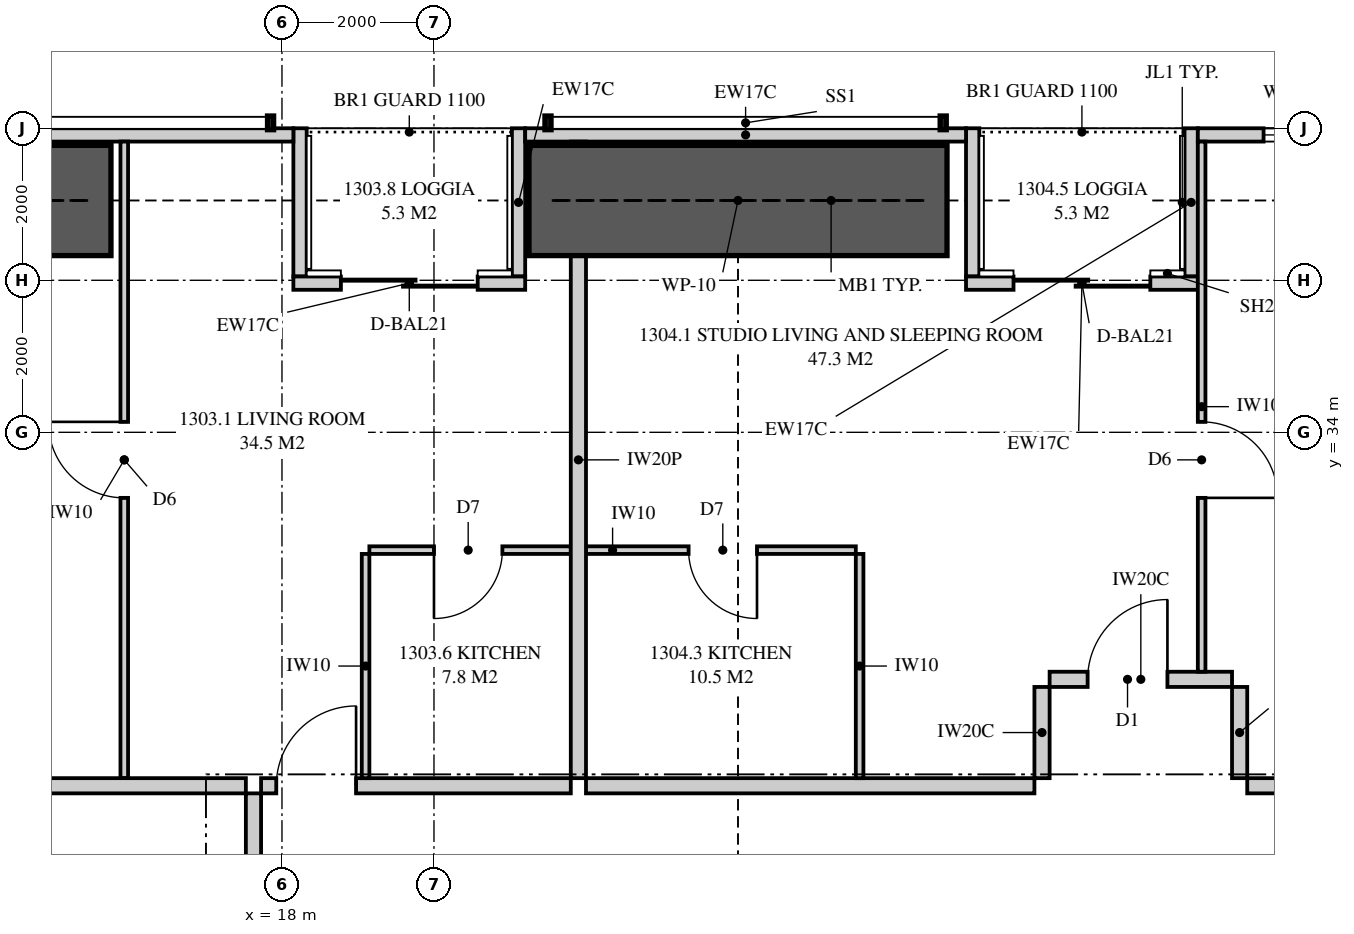
"""IFC4 building model, lengths in metres.
Left out: names, types, materials, properties, quantities, classifications, styles, units other than length and angle.
Written with IfcOpenShell. Run it as: python <this file> out.ifc"""

import sys

from ifc_helpers import new_model, si_unit, direction, frame, frame_2d, origin, place, context, subcontext, project, spatial, polyline, rectangle, outline, extrude, element, fill, save


model = new_model("IFC4")
c1 = context("Model", 3, precision=1e-05, world=origin(), true_north=direction((0.0, 1.0)))
c2 = subcontext(c1, "Body", "Model", "MODEL_VIEW")
j1 = project(units=[si_unit("LENGTHUNIT", "METRE"), si_unit("PLANEANGLEUNIT", "RADIAN")], contexts=[c1])
p1 = place(None, origin())
s1 = spatial("IfcSite", under=j1, at=p1, CompositionType="ELEMENT")
p2 = place(p1, origin())
s2 = spatial("IfcBuilding", under=s1, at=p2, CompositionType="ELEMENT")
p3 = place(p2, frame((0.0, 0.0, 51.15)))
s3 = spatial("IfcBuildingStorey", under=s2, at=p3, CompositionType="ELEMENT", Elevation=51.15)
p4 = place(p3, frame((38.149, 37.913, 0.0), z_axis=(0.0, 0.0, 1.0), x_axis=(-1.0, 0.0, 0.0)))
e1 = element("IfcWall", 1, at=p4, inside=s3, PredefinedType="SOLIDWALL", context=c2, shape_type="SweptSolid", body=[
    extrude(outline(polyline([(0.0, 0.0), (8.099, 0.0), (8.099, 2.15), (3.149, 2.15), (3.149, 3.11), (2.993, 3.11), (2.993, 2.15), (2.945, 2.15), (2.945, 3.11), (0.0, 3.11), (0.0, 0.0)])), frame((0.0, 0.087, 0.0), z_axis=(0.0, -1.0, 0.0), x_axis=(1.0, 0.0, 0.0)), (0.0, 0.0, 1.0), 0.175),
])
p5 = place(p4, frame((6.034, 0.0, 0.4)))
e2 = element("IfcOpeningElement", 2, at=p5, cuts=e1, PredefinedType="OPENING", context=c2, shape_type="SweptSolid", body=[
    extrude(rectangle(XDim=1.2, YDim=1.7, at=frame_2d((0.6, 0.85))), frame((0.0, 0.097, 0.0), z_axis=(0.0, -1.0, 0.0), x_axis=(1.0, 0.0, 0.0)), (0.0, 0.0, 1.0), 0.195),
])
p6 = place(p3, frame((27.0, 37.913, 0.0), z_axis=(0.0, 0.0, 1.0), x_axis=(-1.0, 0.0, 0.0)))
e3 = element("IfcWall", 3, at=p6, inside=s3, PredefinedType="SOLIDWALL", context=c2, shape_type="SweptSolid", body=[
    extrude(rectangle(XDim=5.8, YDim=0.175, at=frame_2d((2.9, 0.0))), origin(), (0.0, 0.0, 1.0), 2.15),
])
p7 = place(p3, frame((18.15, 37.913, 0.0), z_axis=(0.0, 0.0, 1.0), x_axis=(-1.0, 0.0, 0.0)))
e4 = element("IfcWall", 4, at=p7, inside=s3, PredefinedType="SOLIDWALL", context=c2, shape_type="SweptSolid", body=[
    extrude(outline(polyline([(0.0, 0.0), (13.099, 0.0), (13.099, 3.11), (5.354, 3.11), (5.354, 2.15), (5.306, 2.15), (5.306, 3.11), (5.15, 3.11), (5.15, 2.15), (0.0, 2.15), (0.0, 0.0)])), frame((0.0, 0.087, 0.0), z_axis=(0.0, -1.0, 0.0), x_axis=(1.0, 0.0, 0.0)), (0.0, 0.0, 1.0), 0.175),
])
p8 = place(p7, frame((9.05, 0.0, 0.4)))
e5 = element("IfcOpeningElement", 5, at=p8, cuts=e4, PredefinedType="OPENING", context=c2, shape_type="SweptSolid", body=[
    extrude(rectangle(XDim=1.8, YDim=1.7, at=frame_2d((0.9, 0.85))), frame((0.0, 0.097, 0.0), z_axis=(0.0, -1.0, 0.0), x_axis=(1.0, 0.0, 0.0)), (0.0, 0.0, 1.0), 0.195),
])
p9 = place(p3, frame((30.05, 35.962, 0.0), z_axis=(0.0, 0.0, 1.0), x_axis=(-1.0, 0.0, 0.0)))
e6 = element("IfcWall", 6, at=p9, inside=s3, PredefinedType="SOLIDWALL", context=c2, shape_type="SweptSolid", body=[
    extrude(rectangle(XDim=3.05, YDim=0.175, at=frame_2d((1.525, 0.0))), origin(), (0.0, 0.0, 1.0), 3.11),
])
p10 = place(p9, frame((0.625, 0.0, 0.0)))
e7 = element("IfcOpeningElement", 7, at=p10, cuts=e6, PredefinedType="OPENING", context=c2, shape_type="SweptSolid", body=[
    extrude(rectangle(XDim=1.8, YDim=2.1, at=frame_2d((0.9, 1.05))), frame((0.0, 0.097, 0.0), z_axis=(0.0, -1.0, 0.0), x_axis=(1.0, 0.0, 0.0)), (0.0, 0.0, 1.0), 0.195),
])
for number, where, z_axis, x_axis in (
    (8, (29.962, 38.0, 0.0), (0.0, 0.0, 1.0), (0.0, -1.0, 0.0)),
    (9, (27.087, 38.0, 0.0), (0.0, 0.0, 1.0), (0.0, -1.0, 0.0)),
):
    element("IfcWall", number, at=place(p3, frame(where, z_axis=z_axis, x_axis=x_axis)), inside=s3, PredefinedType="SOLIDWALL", context=c2, shape_type="SweptSolid", body=[
        extrude(outline(polyline([(0.0, 0.0), (1.95, 0.0), (1.95, 3.11), (1.75, 3.11), (1.75, 2.15), (0.15, 2.15), (0.15, 3.11), (0.0, 3.11), (0.0, 0.0)])), frame((0.0, 0.087, 0.0), z_axis=(0.0, -1.0, 0.0), x_axis=(1.0, 0.0, 0.0)), (0.0, 0.0, 1.0), 0.175),
    ])
p11 = place(p3, frame((21.2, 35.962, 0.0), z_axis=(0.0, 0.0, 1.0), x_axis=(-1.0, 0.0, 0.0)))
e10 = element("IfcWall", 10, at=p11, inside=s3, PredefinedType="SOLIDWALL", context=c2, shape_type="SweptSolid", body=[
    extrude(rectangle(XDim=3.05, YDim=0.175, at=frame_2d((1.525, 0.0))), origin(), (0.0, 0.0, 1.0), 3.11),
])
p12 = place(p11, frame((0.625, 0.0, 0.0)))
e11 = element("IfcOpeningElement", 11, at=p12, cuts=e10, PredefinedType="OPENING", context=c2, shape_type="SweptSolid", body=[
    extrude(rectangle(XDim=1.8, YDim=2.1, at=frame_2d((0.9, 1.05))), frame((0.0, 0.097, 0.0), z_axis=(0.0, -1.0, 0.0), x_axis=(1.0, 0.0, 0.0)), (0.0, 0.0, 1.0), 0.195),
])
for number, where, z_axis, x_axis in (
    (12, (21.113, 38.0, 0.0), (0.0, 0.0, 1.0), (0.0, -1.0, 0.0)),
    (13, (18.238, 38.0, 0.0), (0.0, 0.0, 1.0), (0.0, -1.0, 0.0)),
):
    element("IfcWall", number, at=place(p3, frame(where, z_axis=z_axis, x_axis=x_axis)), inside=s3, PredefinedType="SOLIDWALL", context=c2, shape_type="SweptSolid", body=[
        extrude(outline(polyline([(0.0, 0.0), (1.95, 0.0), (1.95, 3.11), (1.75, 3.11), (1.75, 2.15), (0.15, 2.15), (0.15, 3.11), (0.0, 3.11), (0.0, 0.0)])), frame((0.0, 0.087, 0.0), z_axis=(0.0, -1.0, 0.0), x_axis=(1.0, 0.0, 0.0)), (0.0, 0.0, 1.0), 0.175),
    ])
p13 = place(p3, frame((21.9, 37.825, 0.0), z_axis=(0.0, 0.0, 1.0), x_axis=(0.0, -1.0, 0.0)))
e14 = element("IfcWall", 14, at=p13, inside=s3, PredefinedType="PARTITIONING", context=c2, shape_type="SweptSolid", body=[
    extrude(outline(polyline([(0.529, 2.15), (0.0, 2.15), (0.0, 0.0), (0.529, 0.0), (0.529, 0.069), (1.021, 0.069), (1.021, 0.0), (8.375, 0.0), (8.375, 3.11), (1.685, 3.11), (1.685, 2.15), (1.021, 2.15), (1.021, 2.082), (0.529, 2.082), (0.529, 2.15)])), frame((0.0, 0.1, 0.0), z_axis=(0.0, -1.0, 0.0), x_axis=(1.0, 0.0, 0.0)), (0.0, 0.0, 1.0), 0.2),
])
p14 = place(p3, frame((17.725, 29.35, 0.0), z_axis=(0.0, 0.0, 1.0), x_axis=(1.0, 0.0, 0.0)))
e15 = element("IfcWall", 15, at=p14, inside=s3, PredefinedType="PARTITIONING", context=c2, shape_type="SweptSolid", body=[
    extrude(rectangle(XDim=4.075, YDim=0.2, at=frame_2d((2.038, 0.0))), origin(), (0.0, 0.0, 1.0), 3.11),
])
p15 = place(p14, frame((0.2, 0.0, 0.0)))
e16 = element("IfcOpeningElement", 16, at=p15, cuts=e15, PredefinedType="OPENING", context=c2, shape_type="SweptSolid", body=[
    extrude(rectangle(XDim=1.05, YDim=2.2, at=frame_2d((0.525, 1.1))), frame((0.0, 0.11, 0.0), z_axis=(0.0, -1.0, 0.0), x_axis=(1.0, 0.0, 0.0)), (0.0, 0.0, 1.0), 0.22),
])
p16 = place(p3, frame((19.15, 32.45, 0.0), z_axis=(0.0, 0.0, 1.0), x_axis=(1.0, 0.0, 0.0)))
e17 = element("IfcWall", 17, at=p16, inside=s3, PredefinedType="PARTITIONING", context=c2, shape_type="SweptSolid", body=[
    extrude(rectangle(XDim=2.65, YDim=0.1, at=frame_2d((1.325, 0.0))), origin(), (0.0, 0.0, 1.0), 3.11),
])
p17 = place(p16, frame((0.85, 0.0, 0.0)))
e18 = element("IfcOpeningElement", 18, at=p17, cuts=e17, PredefinedType="OPENING", context=c2, shape_type="SweptSolid", body=[
    extrude(rectangle(XDim=0.9, YDim=2.1, at=frame_2d((0.45, 1.05))), frame((0.0, 0.06, 0.0), z_axis=(0.0, -1.0, 0.0), x_axis=(1.0, 0.0, 0.0)), (0.0, 0.0, 1.0), 0.12),
])
p18 = place(p3, frame((19.1, 32.4, 0.0), z_axis=(0.0, 0.0, 1.0), x_axis=(0.0, -1.0, 0.0)))
e19 = element("IfcWall", 19, at=p18, inside=s3, PredefinedType="PARTITIONING", context=c2, shape_type="SweptSolid", body=[
    extrude(rectangle(XDim=2.95, YDim=0.1, at=frame_2d((1.475, 0.0))), origin(), (0.0, 0.0, 1.0), 3.11),
])
p19 = place(p3, frame((15.925, 37.825, 0.0), z_axis=(0.0, 0.0, 1.0), x_axis=(0.0, -1.0, 0.0)))
e20 = element("IfcWall", 20, at=p19, inside=s3, PredefinedType="PARTITIONING", context=c2, shape_type="SweptSolid", body=[
    extrude(outline(polyline([(0.0, 0.0), (8.375, 0.0), (8.375, 3.11), (1.635, 3.11), (1.635, 2.15), (0.0, 2.15), (0.0, 3.11), (0.0, 0.0)])), frame((0.0, 0.05, 0.0), z_axis=(0.0, -1.0, 0.0), x_axis=(1.0, 0.0, 0.0)), (0.0, 0.0, 1.0), 0.1),
])
p20 = place(p19, frame((3.688, 0.0, 0.0)))
e21 = element("IfcOpeningElement", 21, at=p20, cuts=e20, PredefinedType="OPENING", context=c2, shape_type="SweptSolid", body=[
    extrude(rectangle(XDim=1.0, YDim=2.1, at=frame_2d((0.5, 1.05))), frame((0.0, 0.06, 0.0), z_axis=(0.0, -1.0, 0.0), x_axis=(1.0, 0.0, 0.0)), (0.0, 0.0, 1.0), 0.12),
])
p21 = place(p3, frame((22.0, 29.35, 0.0), z_axis=(0.0, 0.0, 1.0), x_axis=(1.0, 0.0, 0.0)))
e22 = element("IfcWall", 22, at=p21, inside=s3, PredefinedType="PARTITIONING", context=c2, shape_type="SweptSolid", body=[
    extrude(outline(polyline([(0.0, 0.0), (5.9, 0.0), (5.9, 3.11), (2.337, 3.11), (2.337, 2.541), (1.663, 2.541), (1.663, 3.11), (0.0, 3.11), (0.0, 0.0)])), frame((0.0, 0.1, 0.0), z_axis=(0.0, -1.0, 0.0), x_axis=(1.0, 0.0, 0.0)), (0.0, 0.0, 1.0), 0.2),
])
p22 = place(p3, frame((22.0, 32.45, 0.0), z_axis=(0.0, 0.0, 1.0), x_axis=(1.0, 0.0, 0.0)))
e23 = element("IfcWall", 23, at=p22, inside=s3, PredefinedType="PARTITIONING", context=c2, shape_type="SweptSolid", body=[
    extrude(outline(polyline([(0.0, 0.0), (3.55, 0.0), (3.55, 3.11), (2.287, 3.11), (2.287, 2.541), (1.713, 2.541), (1.713, 3.11), (0.0, 3.11), (0.0, 0.0)])), frame((0.0, 0.05, 0.0), z_axis=(0.0, -1.0, 0.0), x_axis=(1.0, 0.0, 0.0)), (0.0, 0.0, 1.0), 0.1),
])
p23 = place(p22, frame((1.35, 0.0, 0.0)))
e24 = element("IfcOpeningElement", 24, at=p23, cuts=e23, PredefinedType="OPENING", context=c2, shape_type="SweptSolid", body=[
    extrude(rectangle(XDim=0.9, YDim=2.1, at=frame_2d((0.45, 1.05))), frame((0.0, 0.06, 0.0), z_axis=(0.0, -1.0, 0.0), x_axis=(1.0, 0.0, 0.0)), (0.0, 0.0, 1.0), 0.12),
])
p24 = place(p3, frame((25.6, 32.4, 0.0), z_axis=(0.0, 0.0, 1.0), x_axis=(0.0, -1.0, 0.0)))
e25 = element("IfcWall", 25, at=p24, inside=s3, PredefinedType="PARTITIONING", context=c2, shape_type="SweptSolid", body=[
    extrude(rectangle(XDim=2.95, YDim=0.1, at=frame_2d((1.475, 0.0))), origin(), (0.0, 0.0, 1.0), 3.11),
])
p25 = place(p3, frame((30.1, 37.825, 0.0), z_axis=(0.0, 0.0, 1.0), x_axis=(0.0, -1.0, 0.0)))
e26 = element("IfcWall", 26, at=p25, inside=s3, PredefinedType="PARTITIONING", context=c2, shape_type="SweptSolid", body=[
    extrude(outline(polyline([(0.0, 0.0), (6.975, 0.0), (6.975, 3.11), (1.635, 3.11), (1.635, 2.15), (0.0, 2.15), (0.0, 3.11), (0.0, 0.0)])), frame((0.0, 0.05, 0.0), z_axis=(0.0, -1.0, 0.0), x_axis=(1.0, 0.0, 0.0)), (0.0, 0.0, 1.0), 0.1),
])
p26 = place(p25, frame((3.688, 0.0, 0.0)))
e27 = element("IfcOpeningElement", 27, at=p26, cuts=e26, PredefinedType="OPENING", context=c2, shape_type="SweptSolid", body=[
    extrude(rectangle(XDim=1.0, YDim=2.1, at=frame_2d((0.5, 1.05))), frame((0.0, 0.06, 0.0), z_axis=(0.0, -1.0, 0.0), x_axis=(1.0, 0.0, 0.0)), (0.0, 0.0, 1.0), 0.12),
])
p27 = place(p3, frame((2.0, 29.35, 0.0), z_axis=(0.0, 0.0, 1.0), x_axis=(1.0, 0.0, 0.0)))
e28 = element("IfcWall", 28, at=p27, inside=s3, PredefinedType="PARTITIONING", context=c2, shape_type="SweptSolid", body=[
    extrude(outline(polyline([(0.0, 0.0), (15.525, 0.0), (15.525, 3.11), (11.337, 3.11), (11.337, 2.541), (10.663, 2.541), (10.663, 3.11), (9.51, 3.11), (9.51, 2.51), (6.89, 2.51), (6.89, 3.11), (2.969, 3.11), (2.969, 2.541), (2.577, 2.541), (2.577, 2.15), (0.733, 2.15), (0.733, 3.11), (0.0, 3.11), (0.0, 0.0)])), frame((0.0, 0.1, 0.0), z_axis=(0.0, -1.0, 0.0), x_axis=(1.0, 0.0, 0.0)), (0.0, 0.0, 1.0), 0.2),
])
p28 = place(p3, frame((17.625, 15.25, 0.0), z_axis=(0.0, 0.0, 1.0), x_axis=(0.0, 1.0, 0.0)))
e29 = element("IfcWall", 29, at=p28, inside=s3, PredefinedType="PARTITIONING", context=c2, shape_type="SweptSolid", body=[
    extrude(outline(polyline([(0.0, 0.0), (14.0, 0.0), (14.0, 3.11), (10.087, 3.11), (10.087, 2.541), (9.413, 2.541), (9.413, 3.11), (0.0, 3.11), (0.0, 0.0)])), frame((0.0, 0.1, 0.0), z_axis=(0.0, -1.0, 0.0), x_axis=(1.0, 0.0, 0.0)), (0.0, 0.0, 1.0), 0.2),
])
p29 = place(p28, frame((6.5, 0.0, 0.0)))
e30 = element("IfcOpeningElement", 30, at=p29, cuts=e29, PredefinedType="OPENING", context=c2, shape_type="SweptSolid", body=[
    extrude(rectangle(XDim=1.05, YDim=2.2, at=frame_2d((0.525, 1.1))), frame((0.0, 0.11, 0.0), z_axis=(0.0, -1.0, 0.0), x_axis=(1.0, 0.0, 0.0)), (0.0, 0.0, 1.0), 0.22),
])
p30 = place(p3, frame((30.7, 29.35, 0.0), z_axis=(0.0, 0.0, 1.0), x_axis=(1.0, 0.0, 0.0)))
e31 = element("IfcWall", 31, at=p30, inside=s3, PredefinedType="PARTITIONING", context=c2, shape_type="SweptSolid", body=[
    extrude(outline(polyline([(0.0, 0.0), (5.5, 0.0), (5.5, 3.11), (4.637, 3.11), (4.637, 2.541), (3.963, 2.541), (3.963, 3.11), (0.0, 3.11), (0.0, 0.0)])), frame((0.0, 0.1, 0.0), z_axis=(0.0, -1.0, 0.0), x_axis=(1.0, 0.0, 0.0)), (0.0, 0.0, 1.0), 0.2),
])
p31 = place(p3, frame((28.1, 30.75, 0.0), z_axis=(0.0, 0.0, 1.0), x_axis=(1.0, 0.0, 0.0)))
e32 = element("IfcWall", 32, at=p31, inside=s3, PredefinedType="PARTITIONING", context=c2, shape_type="SweptSolid", body=[
    extrude(rectangle(XDim=2.4, YDim=0.2, at=frame_2d((1.2, 0.0))), origin(), (0.0, 0.0, 1.0), 3.11),
])
p32 = place(p31, frame((0.5, 0.0, 0.0)))
e33 = element("IfcOpeningElement", 33, at=p32, cuts=e32, PredefinedType="OPENING", context=c2, shape_type="SweptSolid", body=[
    extrude(rectangle(XDim=1.05, YDim=2.2, at=frame_2d((0.525, 1.1))), frame((0.0, 0.11, 0.0), z_axis=(0.0, -1.0, 0.0), x_axis=(1.0, 0.0, 0.0)), (0.0, 0.0, 1.0), 0.22),
])
for number, where, z_axis, x_axis in (
    (34, (28.0, 29.45, 0.0), (0.0, 0.0, 1.0), (0.0, 1.0, 0.0)),
    (35, (30.6, 29.45, 0.0), (0.0, 0.0, 1.0), (0.0, 1.0, 0.0)),
):
    element("IfcWall", number, at=place(p3, frame(where, z_axis=z_axis, x_axis=x_axis)), inside=s3, PredefinedType="PARTITIONING", context=c2, shape_type="SweptSolid", body=[
        extrude(rectangle(XDim=1.2, YDim=0.2, at=frame_2d((0.6, 0.0))), origin(), (0.0, 0.0, 1.0), 3.11),
    ])
for number, where, z_axis, x_axis in (
    (36, (21.25, 37.05, 0.0), (0.0, 0.0, 1.0), (1.0, 0.0, 0.0)),
    (37, (10.25, 37.05, 0.0), (0.0, 0.0, 1.0), (1.0, 0.0, 0.0)),
):
    element("IfcWall", number, at=place(p3, frame(where, z_axis=z_axis, x_axis=x_axis)), inside=s3, PredefinedType="SHEAR", context=c2, shape_type="SweptSolid", body=[
        extrude(rectangle(XDim=5.5, YDim=1.45, at=frame_2d((2.75, 0.0))), origin(), (0.0, 0.0, 1.0), 3.35),
    ])
p33 = place(p5, origin())
e38 = element("IfcWindow", 38, at=p33, inside=s3, PartitioningType="SINGLE_PANEL", PredefinedType="WINDOW", context=c2, shape_type="SweptSolid", body=[
    extrude(rectangle(XDim=1.2, YDim=1.7, at=frame_2d((0.6, 0.85))), frame((0.0, 0.03, 0.0), z_axis=(0.0, -1.0, 0.0), x_axis=(1.0, 0.0, 0.0)), (0.0, 0.0, 1.0), 0.06),
])
fill(e2, e38)
p34 = place(p10, origin())
e39 = element("IfcDoor", 39, at=p34, inside=s3, OperationType="SLIDING_TO_LEFT", PredefinedType="DOOR", context=c2, shape_type="SweptSolid", body=[
    extrude(rectangle(XDim=1.8, YDim=2.1, at=frame_2d((0.9, 1.05))), frame((0.0, 0.025, 0.0), z_axis=(0.0, -1.0, 0.0), x_axis=(1.0, 0.0, 0.0)), (0.0, 0.0, 1.0), 0.05),
])
fill(e7, e39)
p35 = place(p12, origin())
e40 = element("IfcDoor", 40, at=p35, inside=s3, OperationType="SLIDING_TO_LEFT", PredefinedType="DOOR", context=c2, shape_type="SweptSolid", body=[
    extrude(rectangle(XDim=1.8, YDim=2.1, at=frame_2d((0.9, 1.05))), frame((0.0, 0.025, 0.0), z_axis=(0.0, -1.0, 0.0), x_axis=(1.0, 0.0, 0.0)), (0.0, 0.0, 1.0), 0.05),
])
fill(e11, e40)
p36 = place(p15, origin())
e41 = element("IfcDoor", 41, at=p36, inside=s3, OperationType="SINGLE_SWING_RIGHT", PredefinedType="DOOR", context=c2, shape_type="SweptSolid", body=[
    extrude(rectangle(XDim=1.05, YDim=2.2, at=frame_2d((0.525, 1.1))), frame((0.0, 0.025, 0.0), z_axis=(0.0, -1.0, 0.0), x_axis=(1.0, 0.0, 0.0)), (0.0, 0.0, 1.0), 0.05),
])
fill(e16, e41)
p37 = place(p17, frame((0.9, 0.0, 0.0), z_axis=(0.0, 0.0, 1.0), x_axis=(-1.0, 0.0, 0.0)))
e42 = element("IfcDoor", 42, at=p37, inside=s3, OperationType="SINGLE_SWING_RIGHT", PredefinedType="DOOR", context=c2, shape_type="SweptSolid", body=[
    extrude(rectangle(XDim=0.9, YDim=2.1, at=frame_2d((0.45, 1.05))), frame((0.0, 0.025, 0.0), z_axis=(0.0, -1.0, 0.0), x_axis=(1.0, 0.0, 0.0)), (0.0, 0.0, 1.0), 0.05),
])
fill(e18, e42)
p38 = place(p20, frame((1.0, 0.0, 0.0), z_axis=(0.0, 0.0, 1.0), x_axis=(-1.0, 0.0, 0.0)))
e43 = element("IfcDoor", 43, at=p38, inside=s3, OperationType="SINGLE_SWING_RIGHT", PredefinedType="DOOR", context=c2, shape_type="SweptSolid", body=[
    extrude(rectangle(XDim=1.0, YDim=2.1, at=frame_2d((0.5, 1.05))), frame((0.0, 0.025, 0.0), z_axis=(0.0, -1.0, 0.0), x_axis=(1.0, 0.0, 0.0)), (0.0, 0.0, 1.0), 0.05),
])
fill(e21, e43)
p39 = place(p32, origin())
e44 = element("IfcDoor", 44, at=p39, inside=s3, OperationType="SINGLE_SWING_RIGHT", PredefinedType="DOOR", context=c2, shape_type="SweptSolid", body=[
    extrude(rectangle(XDim=1.05, YDim=2.2, at=frame_2d((0.525, 1.1))), frame((0.0, 0.025, 0.0), z_axis=(0.0, -1.0, 0.0), x_axis=(1.0, 0.0, 0.0)), (0.0, 0.0, 1.0), 0.05),
])
fill(e33, e44)
p40 = place(p23, frame((0.9, 0.0, 0.0), z_axis=(0.0, 0.0, 1.0), x_axis=(-1.0, 0.0, 0.0)))
e45 = element("IfcDoor", 45, at=p40, inside=s3, OperationType="SINGLE_SWING_LEFT", PredefinedType="DOOR", context=c2, shape_type="SweptSolid", body=[
    extrude(rectangle(XDim=0.9, YDim=2.1, at=frame_2d((0.45, 1.05))), frame((0.0, 0.025, 0.0), z_axis=(0.0, -1.0, 0.0), x_axis=(1.0, 0.0, 0.0)), (0.0, 0.0, 1.0), 0.05),
])
fill(e24, e45)
p41 = place(p26, origin())
e46 = element("IfcDoor", 46, at=p41, inside=s3, OperationType="SINGLE_SWING_RIGHT", PredefinedType="DOOR", context=c2, shape_type="SweptSolid", body=[
    extrude(rectangle(XDim=1.0, YDim=2.1, at=frame_2d((0.5, 1.05))), frame((0.0, 0.025, 0.0), z_axis=(0.0, -1.0, 0.0), x_axis=(1.0, 0.0, 0.0)), (0.0, 0.0, 1.0), 0.05),
])
fill(e27, e46)
save(model, sys.argv[1])
